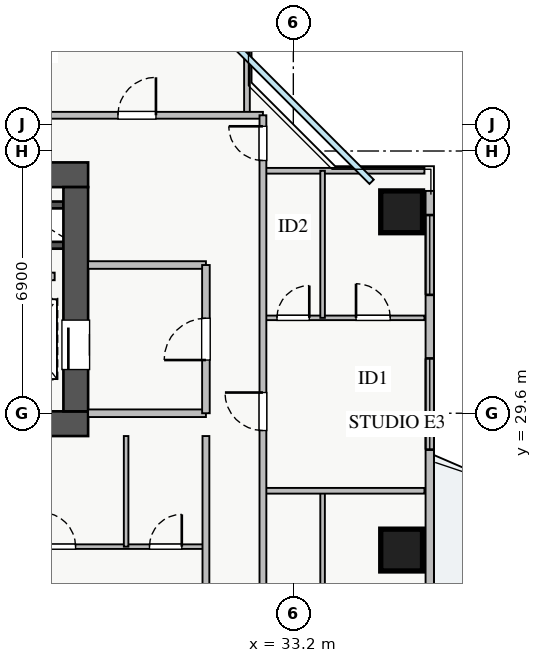
"""IFC4 building model, lengths in metres.
Left out: names, types, materials, properties, quantities, classifications, styles, units other than length and angle.
Written with IfcOpenShell. Run it as: python <this file> out.ifc"""

import sys

from ifc_helpers import new_model, si_unit, direction, frame, frame_2d, origin, origin_2d, place, context, subcontext, project, spatial, rectangle, extrude, source, transform, mapped, element, fill, save


model = new_model("IFC4")
c1 = context("Model", 3, precision=1e-05, world=origin(), true_north=direction((0.0, 1.0)))
c2 = subcontext(c1, "Body", "Model", "MODEL_VIEW")
j1 = project(units=[si_unit("LENGTHUNIT", "METRE"), si_unit("PLANEANGLEUNIT", "RADIAN")], contexts=[c1])
p1 = place(None, origin())
s1 = spatial("IfcSite", under=j1, at=p1, CompositionType="ELEMENT")
p2 = place(p1, origin())
s2 = spatial("IfcBuilding", under=s1, at=p2, CompositionType="ELEMENT")
p3 = place(p2, frame((0.0, 0.0, 100.25)))
s3 = spatial("IfcBuildingStorey", under=s2, at=p3, CompositionType="ELEMENT", Elevation=100.25)
for number, where, z_axis, x_axis in (
    (1, (25.8, 35.08, 0.0), (0.0, 0.0, 1.0), (1.0, 0.0, 0.0)),
    (2, (25.8, 34.02, 0.0), (0.0, 0.0, 1.0), (1.0, 0.0, 0.0)),
):
    element("IfcWall", number, at=place(p3, frame(where, z_axis=z_axis, x_axis=x_axis)), inside=s3, PredefinedType="SHEAR", context=c2, shape_type="SweptSolid", body=[
        extrude(rectangle(XDim=1.35, YDim=0.18, at=frame_2d((0.675, 0.0))), origin(), (0.0, 0.0, 1.0), 3.07),
    ])
p4 = place(p3, frame((10.2, 29.325, 0.0), z_axis=(0.0, 0.0, 1.0), x_axis=(1.0, 0.0, 0.0)))
e3 = element("IfcWall", 3, at=p4, inside=s3, PredefinedType="SHEAR", context=c2, shape_type="SweptSolid", body=[
    extrude(rectangle(XDim=17.6, YDim=0.65, at=frame_2d((8.8, 0.0))), origin(), (0.0, 0.0, 1.0), 3.25),
])
p5 = place(p3, frame((10.2, 35.875, 0.0), z_axis=(0.0, 0.0, 1.0), x_axis=(1.0, 0.0, 0.0)))
e4 = element("IfcWall", 4, at=p5, inside=s3, PredefinedType="SHEAR", context=c2, shape_type="SweptSolid", body=[
    extrude(rectangle(XDim=17.6, YDim=0.65, at=frame_2d((8.8, 0.0))), origin(), (0.0, 0.0, 1.0), 3.25),
])
p6 = place(p5, frame((1.15, 0.0, 0.0)))
e5 = element("IfcOpeningElement", 5, at=p6, cuts=e4, PredefinedType="OPENING", context=c2, shape_type="SweptSolid", body=[
    extrude(rectangle(XDim=1.1, YDim=2.05, at=frame_2d((0.55, 1.025))), frame((0.0, 0.335, 0.0), z_axis=(0.0, -1.0, 0.0), x_axis=(1.0, 0.0, 0.0)), (0.0, 0.0, 1.0), 0.67),
])
p7 = place(p5, frame((8.3, 0.0, 0.0)))
e6 = element("IfcOpeningElement", 6, at=p7, cuts=e4, PredefinedType="OPENING", context=c2, shape_type="SweptSolid", body=[
    extrude(rectangle(XDim=1.1, YDim=2.05, at=frame_2d((0.55, 1.025))), frame((0.0, 0.335, 0.0), z_axis=(0.0, -1.0, 0.0), x_axis=(1.0, 0.0, 0.0)), (0.0, 0.0, 1.0), 0.67),
])
p8 = place(p5, frame((4.9, 0.0, 0.0)))
e7 = element("IfcOpeningElement", 7, at=p8, cuts=e4, PredefinedType="OPENING", context=c2, shape_type="SweptSolid", body=[
    extrude(rectangle(XDim=1.1, YDim=2.05, at=frame_2d((0.55, 1.025))), frame((0.0, 0.335, 0.0), z_axis=(0.0, -1.0, 0.0), x_axis=(1.0, 0.0, 0.0)), (0.0, 0.0, 1.0), 0.67),
])
p9 = place(p5, frame((14.74, 0.0, 0.0)))
e8 = element("IfcOpeningElement", 8, at=p9, cuts=e4, PredefinedType="OPENING", context=c2, shape_type="SweptSolid", body=[
    extrude(rectangle(XDim=1.0, YDim=2.05, at=frame_2d((0.5, 1.025))), frame((0.0, 0.335, 0.0), z_axis=(0.0, -1.0, 0.0), x_axis=(1.0, 0.0, 0.0)), (0.0, 0.0, 1.0), 0.67),
])
p10 = place(p5, frame((10.25, 0.0, 0.0)))
e9 = element("IfcOpeningElement", 9, at=p10, cuts=e4, PredefinedType="OPENING", context=c2, shape_type="SweptSolid", body=[
    extrude(rectangle(XDim=1.0, YDim=2.05, at=frame_2d((0.5, 1.025))), frame((0.0, 0.335, 0.0), z_axis=(0.0, -1.0, 0.0), x_axis=(1.0, 0.0, 0.0)), (0.0, 0.0, 1.0), 0.67),
])
p11 = place(p5, frame((12.7, 0.0, 0.0)))
e10 = element("IfcOpeningElement", 10, at=p11, cuts=e4, PredefinedType="OPENING", context=c2, shape_type="SweptSolid", body=[
    extrude(rectangle(XDim=1.0, YDim=2.05, at=frame_2d((0.5, 1.025))), frame((0.0, 0.335, 0.0), z_axis=(0.0, -1.0, 0.0), x_axis=(1.0, 0.0, 0.0)), (0.0, 0.0, 1.0), 0.67),
])
p12 = place(p3, frame((27.475, 29.65, 0.0), z_axis=(0.0, 0.0, 1.0), x_axis=(0.0, 1.0, 0.0)))
e11 = element("IfcWall", 11, at=p12, inside=s3, PredefinedType="SHEAR", context=c2, shape_type="SweptSolid", body=[
    extrude(rectangle(XDim=5.9, YDim=0.65, at=frame_2d((2.95, 0.0))), origin(), (0.0, 0.0, 1.0), 3.25),
])
p13 = place(p12, frame((1.1, 0.0, 0.0)))
e12 = element("IfcOpeningElement", 12, at=p13, cuts=e11, PredefinedType="OPENING", context=c2, shape_type="SweptSolid", body=[
    extrude(rectangle(XDim=1.3, YDim=2.05, at=frame_2d((0.65, 1.025))), frame((0.0, 0.335, 0.0), z_axis=(0.0, -1.0, 0.0), x_axis=(1.0, 0.0, 0.0)), (0.0, 0.0, 1.0), 0.67),
])
m1 = source(origin(), c2, "Body", "SweptSolid", [
    extrude(rectangle(XDim=1.1, YDim=1.1, at=origin_2d()), origin(), (0.0, 0.0, 1.0), 3.25),
])
for number, where, z_axis, x_axis in (
    (13, (36.05, 26.0, 0.0), (0.0, 0.0, 1.0), (1.0, 0.0, 0.0)),
    (14, (36.05, 34.9, 0.0), (0.0, 0.0, 1.0), (1.0, 0.0, 0.0)),
):
    element("IfcColumn", number, at=place(p3, frame(where, z_axis=z_axis, x_axis=x_axis)), inside=s3, PredefinedType="COLUMN", context=c2, shape_type="MappedRepresentation", body=[
        mapped(m1, transform((0.0, 0.0, 0.0), x_axis=(1.0, 0.0, 0.0), y_axis=(0.0, 1.0, 0.0), z_axis=(0.0, 0.0, 1.0), scale=1.0)),
    ])
p14 = place(p3, frame((36.79, 10.55, 0.0), z_axis=(0.0, 0.0, 1.0), x_axis=(0.0, 1.0, 0.0)))
e15 = element("IfcWall", 15, at=p14, inside=s3, PredefinedType="STANDARD", context=c2, shape_type="SweptSolid", body=[
    extrude(rectangle(XDim=24.9, YDim=0.22, at=frame_2d((12.45, 0.0))), origin(), (0.0, 0.0, 1.0), 2.61),
])
p15 = place(p14, frame((13.3, 0.0, 0.0)))
e16 = element("IfcOpeningElement", 16, at=p15, cuts=e15, PredefinedType="OPENING", context=c2, shape_type="SweptSolid", body=[
    extrude(rectangle(XDim=1.2, YDim=2.1, at=frame_2d((0.6, 1.05))), frame((0.0, 0.12, 0.0), z_axis=(0.0, -1.0, 0.0), x_axis=(1.0, 0.0, 0.0)), (0.0, 0.0, 1.0), 0.24),
])
p16 = place(p14, frame((1.912, 0.0, 0.9)))
e17 = element("IfcOpeningElement", 17, at=p16, cuts=e15, PredefinedType="OPENING", context=c2, shape_type="SweptSolid", body=[
    extrude(rectangle(XDim=2.4, YDim=1.48, at=frame_2d((1.2, 0.74))), frame((0.0, 0.12, 0.0), z_axis=(0.0, -1.0, 0.0), x_axis=(1.0, 0.0, 0.0)), (0.0, 0.0, 1.0), 0.24),
])
p17 = place(p14, frame((22.165, 0.0, 0.9)))
e18 = element("IfcOpeningElement", 18, at=p17, cuts=e15, PredefinedType="OPENING", context=c2, shape_type="SweptSolid", body=[
    extrude(rectangle(XDim=2.1, YDim=1.5, at=frame_2d((1.05, 0.75))), frame((0.0, 0.12, 0.0), z_axis=(0.0, -1.0, 0.0), x_axis=(1.0, 0.0, 0.0)), (0.0, 0.0, 1.0), 0.24),
])
p18 = place(p14, frame((18.093, 0.0, 0.9)))
e19 = element("IfcOpeningElement", 19, at=p18, cuts=e15, PredefinedType="OPENING", context=c2, shape_type="SweptSolid", body=[
    extrude(rectangle(XDim=2.4, YDim=1.5, at=frame_2d((1.2, 0.75))), frame((0.0, 0.12, 0.0), z_axis=(0.0, -1.0, 0.0), x_axis=(1.0, 0.0, 0.0)), (0.0, 0.0, 1.0), 0.24),
])
p19 = place(p14, frame((9.045, 0.0, 0.9)))
e20 = element("IfcOpeningElement", 20, at=p19, cuts=e15, PredefinedType="OPENING", context=c2, shape_type="SweptSolid", body=[
    extrude(rectangle(XDim=0.9, YDim=1.2, at=frame_2d((0.45, 0.6))), frame((0.0, 0.12, 0.0), z_axis=(0.0, -1.0, 0.0), x_axis=(1.0, 0.0, 0.0)), (0.0, 0.0, 1.0), 0.24),
])
for number, where, z_axis, x_axis in (
    (21, (27.8, 29.6, 0.0), (0.0, 0.0, 1.0), (1.0, 0.0, 0.0)),
    (22, (27.8, 33.5, 0.0), (0.0, 0.0, 1.0), (1.0, 0.0, 0.0)),
):
    element("IfcWall", number, at=place(p3, frame(where, z_axis=z_axis, x_axis=x_axis)), inside=s3, PredefinedType="PARTITIONING", context=c2, shape_type="SweptSolid", body=[
        extrude(rectangle(XDim=3.1, YDim=0.2, at=frame_2d((1.55, 0.0))), origin(), (0.0, 0.0, 1.0), 3.07),
    ])
p20 = place(p3, frame((30.9, 29.6, 0.0), z_axis=(0.0, 0.0, 1.0), x_axis=(0.0, 1.0, 0.0)))
e23 = element("IfcWall", 23, at=p20, inside=s3, PredefinedType="PARTITIONING", context=c2, shape_type="SweptSolid", body=[
    extrude(rectangle(XDim=3.9, YDim=0.2, at=frame_2d((1.95, 0.0))), origin(), (0.0, 0.0, 1.0), 3.07),
])
p21 = place(p20, frame((1.4, 0.0, 0.0)))
e24 = element("IfcOpeningElement", 24, at=p21, cuts=e23, PredefinedType="OPENING", context=c2, shape_type="SweptSolid", body=[
    extrude(rectangle(XDim=1.1, YDim=2.05, at=frame_2d((0.55, 1.025))), frame((0.0, 0.11, 0.0), z_axis=(0.0, -1.0, 0.0), x_axis=(1.0, 0.0, 0.0)), (0.0, 0.0, 1.0), 0.22),
])
p22 = place(p3, frame((21.75, 33.2, 0.0), z_axis=(0.0, 0.0, 1.0), x_axis=(1.0, 0.0, 0.0)))
e25 = element("IfcWall", 25, at=p22, inside=s3, PredefinedType="PARTITIONING", context=c2, shape_type="SweptSolid", body=[
    extrude(rectangle(XDim=5.17, YDim=0.2, at=frame_2d((2.585, 0.0))), origin(), (0.0, 0.0, 1.0), 3.07),
])
p23 = place(p3, frame((31.98, 37.44, 0.0), z_axis=(0.0, 0.0, 1.0), x_axis=(0.0, 1.0, 0.0)))
e26 = element("IfcWall", 26, at=p23, inside=s3, PredefinedType="PARTITIONING", context=c2, shape_type="SweptSolid", body=[
    extrude(rectangle(XDim=3.21, YDim=0.15, at=frame_2d((1.605, 0.0))), origin(), (0.0, 0.0, 1.0), 3.07),
])
p24 = place(p3, frame((8.82, 37.44, 0.0), z_axis=(0.0, 0.0, 1.0), x_axis=(1.0, 0.0, 0.0)))
e27 = element("IfcWall", 27, at=p24, inside=s3, PredefinedType="PARTITIONING", context=c2, shape_type="SweptSolid", body=[
    extrude(rectangle(XDim=23.58, YDim=0.18, at=frame_2d((11.79, 0.0))), origin(), (0.0, 0.0, 1.0), 3.07),
])
p25 = place(p24, frame((2.75, 0.0, 0.0)))
e28 = element("IfcOpeningElement", 28, at=p25, cuts=e27, PredefinedType="OPENING", context=c2, shape_type="SweptSolid", body=[
    extrude(rectangle(XDim=1.0, YDim=2.05, at=frame_2d((0.5, 1.025))), frame((0.0, 0.1, 0.0), z_axis=(0.0, -1.0, 0.0), x_axis=(1.0, 0.0, 0.0)), (0.0, 0.0, 1.0), 0.2),
])
p26 = place(p24, frame((7.89, 0.0, 0.0)))
e29 = element("IfcOpeningElement", 29, at=p26, cuts=e27, PredefinedType="OPENING", context=c2, shape_type="SweptSolid", body=[
    extrude(rectangle(XDim=1.0, YDim=2.05, at=frame_2d((0.5, 1.025))), frame((0.0, 0.1, 0.0), z_axis=(0.0, -1.0, 0.0), x_axis=(1.0, 0.0, 0.0)), (0.0, 0.0, 1.0), 0.2),
])
p27 = place(p24, frame((13.325, 0.0, 0.0)))
e30 = element("IfcOpeningElement", 30, at=p27, cuts=e27, PredefinedType="OPENING", context=c2, shape_type="SweptSolid", body=[
    extrude(rectangle(XDim=1.0, YDim=2.05, at=frame_2d((0.5, 1.025))), frame((0.0, 0.1, 0.0), z_axis=(0.0, -1.0, 0.0), x_axis=(1.0, 0.0, 0.0)), (0.0, 0.0, 1.0), 0.2),
])
p28 = place(p24, frame((19.765, 0.0, 0.0)))
e31 = element("IfcOpeningElement", 31, at=p28, cuts=e27, PredefinedType="OPENING", context=c2, shape_type="SweptSolid", body=[
    extrude(rectangle(XDim=1.0, YDim=2.05, at=frame_2d((0.5, 1.025))), frame((0.0, 0.1, 0.0), z_axis=(0.0, -1.0, 0.0), x_axis=(1.0, 0.0, 0.0)), (0.0, 0.0, 1.0), 0.2),
])
p29 = place(p3, frame((32.4, 35.98, 0.0), z_axis=(0.0, 0.0, 1.0), x_axis=(1.0, 0.0, 0.0)))
e32 = element("IfcWall", 32, at=p29, inside=s3, PredefinedType="PARTITIONING", context=c2, shape_type="SweptSolid", body=[
    extrude(rectangle(XDim=4.25, YDim=0.15, at=frame_2d((2.125, 0.0))), origin(), (0.0, 0.0, 1.0), 3.07),
])
p30 = place(p3, frame((33.97, 23.1, 0.0), z_axis=(0.0, 0.0, 1.0), x_axis=(0.0, 1.0, 0.0)))
e33 = element("IfcWall", 33, at=p30, inside=s3, PredefinedType="PLUMBINGWALL", context=c2, shape_type="SweptSolid", body=[
    extrude(rectangle(XDim=4.46, YDim=0.12, at=frame_2d((2.23, 0.0))), origin(), (0.0, 0.0, 1.0), 3.07),
])
p31 = place(p3, frame((32.4, 32.11, 0.0), z_axis=(0.0, 0.0, 1.0), x_axis=(1.0, 0.0, 0.0)))
e34 = element("IfcWall", 34, at=p31, inside=s3, PredefinedType="PLUMBINGWALL", context=c2, shape_type="SweptSolid", body=[
    extrude(rectangle(XDim=4.25, YDim=0.12, at=frame_2d((2.125, 0.0))), origin(), (0.0, 0.0, 1.0), 3.07),
])
p32 = place(p31, frame((0.37, 0.0, 0.0)))
e35 = element("IfcOpeningElement", 35, at=p32, cuts=e34, PredefinedType="OPENING", context=c2, shape_type="SweptSolid", body=[
    extrude(rectangle(XDim=0.85, YDim=2.05, at=frame_2d((0.425, 1.025))), frame((0.0, 0.07, 0.0), z_axis=(0.0, -1.0, 0.0), x_axis=(1.0, 0.0, 0.0)), (0.0, 0.0, 1.0), 0.14),
])
p33 = place(p31, frame((2.45, 0.0, 0.0)))
e36 = element("IfcOpeningElement", 36, at=p33, cuts=e34, PredefinedType="OPENING", context=c2, shape_type="SweptSolid", body=[
    extrude(rectangle(XDim=0.9, YDim=2.05, at=frame_2d((0.45, 1.025))), frame((0.0, 0.07, 0.0), z_axis=(0.0, -1.0, 0.0), x_axis=(1.0, 0.0, 0.0)), (0.0, 0.0, 1.0), 0.14),
])
p34 = place(p3, frame((33.97, 32.11, 0.0), z_axis=(0.0, 0.0, 1.0), x_axis=(0.0, 1.0, 0.0)))
e37 = element("IfcWall", 37, at=p34, inside=s3, PredefinedType="PLUMBINGWALL", context=c2, shape_type="SweptSolid", body=[
    extrude(rectangle(XDim=3.87, YDim=0.12, at=frame_2d((1.935, 0.0))), origin(), (0.0, 0.0, 1.0), 3.07),
])
p35 = place(p3, frame((32.4, 27.56, 0.0), z_axis=(0.0, 0.0, 1.0), x_axis=(1.0, 0.0, 0.0)))
e38 = element("IfcWall", 38, at=p35, inside=s3, PredefinedType="PARTITIONING", context=c2, shape_type="SweptSolid", body=[
    extrude(rectangle(XDim=4.25, YDim=0.15, at=frame_2d((2.125, 0.0))), origin(), (0.0, 0.0, 1.0), 3.07),
])
p36 = place(p3, frame((32.4, 8.31, 0.0), z_axis=(0.0, 0.0, 1.0), x_axis=(0.0, 1.0, 0.0)))
e39 = element("IfcWall", 39, at=p36, inside=s3, PredefinedType="PARTITIONING", context=c2, shape_type="SweptSolid", body=[
    extrude(rectangle(XDim=29.13, YDim=0.18, at=frame_2d((14.565, 0.0))), origin(), (0.0, 0.0, 1.0), 3.07),
])
p37 = place(p36, frame((27.94, 0.0, 0.0)))
e40 = element("IfcOpeningElement", 40, at=p37, cuts=e39, PredefinedType="OPENING", context=c2, shape_type="SweptSolid", body=[
    extrude(rectangle(XDim=0.9, YDim=2.05, at=frame_2d((0.45, 1.025))), frame((0.0, 0.1, 0.0), z_axis=(0.0, -1.0, 0.0), x_axis=(1.0, 0.0, 0.0)), (0.0, 0.0, 1.0), 0.2),
])
p38 = place(p36, frame((0.415, 0.0, 0.0)))
e41 = element("IfcOpeningElement", 41, at=p38, cuts=e39, PredefinedType="OPENING", context=c2, shape_type="SweptSolid", body=[
    extrude(rectangle(XDim=0.9, YDim=2.05, at=frame_2d((0.45, 1.025))), frame((0.0, 0.1, 0.0), z_axis=(0.0, -1.0, 0.0), x_axis=(1.0, 0.0, 0.0)), (0.0, 0.0, 1.0), 0.2),
])
p39 = place(p36, frame((5.88, 0.0, 0.0)))
e42 = element("IfcOpeningElement", 42, at=p39, cuts=e39, PredefinedType="OPENING", context=c2, shape_type="SweptSolid", body=[
    extrude(rectangle(XDim=1.0, YDim=2.05, at=frame_2d((0.5, 1.025))), frame((0.0, 0.1, 0.0), z_axis=(0.0, -1.0, 0.0), x_axis=(1.0, 0.0, 0.0)), (0.0, 0.0, 1.0), 0.2),
])
p40 = place(p36, frame((12.23, 0.0, 0.0)))
e43 = element("IfcOpeningElement", 43, at=p40, cuts=e39, PredefinedType="OPENING", context=c2, shape_type="SweptSolid", body=[
    extrude(rectangle(XDim=1.0, YDim=2.05, at=frame_2d((0.5, 1.025))), frame((0.0, 0.1, 0.0), z_axis=(0.0, -1.0, 0.0), x_axis=(1.0, 0.0, 0.0)), (0.0, 0.0, 1.0), 0.2),
])
p41 = place(p36, frame((20.835, 0.0, 0.0)))
e44 = element("IfcOpeningElement", 44, at=p41, cuts=e39, PredefinedType="OPENING", context=c2, shape_type="SweptSolid", body=[
    extrude(rectangle(XDim=1.0, YDim=2.05, at=frame_2d((0.5, 1.025))), frame((0.0, 0.1, 0.0), z_axis=(0.0, -1.0, 0.0), x_axis=(1.0, 0.0, 0.0)), (0.0, 0.0, 1.0), 0.2),
])
p42 = place(p3, frame((25.22, 26.09, 0.0), z_axis=(0.0, 0.0, 1.0), x_axis=(1.0, 0.0, 0.0)))
e45 = element("IfcWall", 45, at=p42, inside=s3, PredefinedType="PLUMBINGWALL", context=c2, shape_type="SweptSolid", body=[
    extrude(rectangle(XDim=5.68, YDim=0.12, at=frame_2d((2.84, 0.0))), origin(), (0.0, 0.0, 1.0), 2.625),
])
p43 = place(p42, frame((1.35, 0.0, 0.0)))
e46 = element("IfcOpeningElement", 46, at=p43, cuts=e45, PredefinedType="OPENING", context=c2, shape_type="SweptSolid", body=[
    extrude(rectangle(XDim=0.9, YDim=2.05, at=frame_2d((0.45, 1.025))), frame((0.0, 0.07, 0.0), z_axis=(0.0, -1.0, 0.0), x_axis=(1.0, 0.0, 0.0)), (0.0, 0.0, 1.0), 0.14),
])
p44 = place(p42, frame((4.195, 0.0, 0.0)))
e47 = element("IfcOpeningElement", 47, at=p44, cuts=e45, PredefinedType="OPENING", context=c2, shape_type="SweptSolid", body=[
    extrude(rectangle(XDim=0.85, YDim=2.05, at=frame_2d((0.425, 1.025))), frame((0.0, 0.07, 0.0), z_axis=(0.0, -1.0, 0.0), x_axis=(1.0, 0.0, 0.0)), (0.0, 0.0, 1.0), 0.14),
])
p45 = place(p3, frame((28.8, 26.09, 0.0), z_axis=(0.0, 0.0, 1.0), x_axis=(0.0, 1.0, 0.0)))
e48 = element("IfcWall", 48, at=p45, inside=s3, PredefinedType="PLUMBINGWALL", context=c2, shape_type="SweptSolid", body=[
    extrude(rectangle(XDim=2.91, YDim=0.12, at=frame_2d((1.455, 0.0))), origin(), (0.0, 0.0, 1.0), 3.07),
])
p46 = place(p3, frame((30.9, 17.0, 0.0), z_axis=(0.0, 0.0, 1.0), x_axis=(0.0, 1.0, 0.0)))
e49 = element("IfcWall", 49, at=p46, inside=s3, PredefinedType="PARTITIONING", context=c2, shape_type="SweptSolid", body=[
    extrude(rectangle(XDim=12.0, YDim=0.18, at=frame_2d((6.0, 0.0))), origin(), (0.0, 0.0, 1.0), 3.07),
])
p47 = place(p46, frame((0.84, 0.0, 0.0)))
e50 = element("IfcOpeningElement", 50, at=p47, cuts=e49, PredefinedType="OPENING", context=c2, shape_type="SweptSolid", body=[
    extrude(rectangle(XDim=1.0, YDim=2.05, at=frame_2d((0.5, 1.025))), frame((0.0, 0.1, 0.0), z_axis=(0.0, -1.0, 0.0), x_axis=(1.0, 0.0, 0.0)), (0.0, 0.0, 1.0), 0.2),
])
p48 = place(p46, frame((6.69, 0.0, 0.0)))
e51 = element("IfcOpeningElement", 51, at=p48, cuts=e49, PredefinedType="OPENING", context=c2, shape_type="SweptSolid", body=[
    extrude(rectangle(XDim=1.0, YDim=2.05, at=frame_2d((0.5, 1.025))), frame((0.0, 0.1, 0.0), z_axis=(0.0, -1.0, 0.0), x_axis=(1.0, 0.0, 0.0)), (0.0, 0.0, 1.0), 0.2),
])
m2 = source(origin(), c2, "Body", "SweptSolid", [
    extrude(rectangle(XDim=2.1, YDim=1.5, at=frame_2d((1.05, 0.75))), frame((0.0, 0.03, 0.0), z_axis=(0.0, -1.0, 0.0), x_axis=(1.0, 0.0, 0.0)), (0.0, 0.0, 1.0), 0.06),
])
p49 = place(p17, origin())
e52 = element("IfcWindow", 52, at=p49, inside=s3, PartitioningType="TRIPLE_PANEL_VERTICAL", PredefinedType="WINDOW", context=c2, shape_type="MappedRepresentation", body=[
    mapped(m2, transform((0.0, 0.0, 0.0), x_axis=(1.0, 0.0, 0.0), y_axis=(0.0, 1.0, 0.0), z_axis=(0.0, 0.0, 1.0), scale=1.0)),
])
fill(e18, e52)
m3 = source(origin(), c2, "Body", "SweptSolid", [
    extrude(rectangle(XDim=1.3, YDim=2.05, at=frame_2d((0.65, 1.025))), frame((0.0, 0.025, 0.0), z_axis=(0.0, -1.0, 0.0), x_axis=(1.0, 0.0, 0.0)), (0.0, 0.0, 1.0), 0.05),
])
p50 = place(p13, origin())
e53 = element("IfcDoor", 53, at=p50, inside=s3, OperationType="SLIDING_TO_LEFT", PredefinedType="DOOR", context=c2, shape_type="MappedRepresentation", body=[
    mapped(m3, transform((0.0, 0.0, 0.0), x_axis=(1.0, 0.0, 0.0), y_axis=(0.0, 1.0, 0.0), z_axis=(0.0, 0.0, 1.0), scale=1.0)),
])
fill(e12, e53)
m4 = source(origin(), c2, "Body", "SweptSolid", [
    extrude(rectangle(XDim=1.1, YDim=2.05, at=frame_2d((0.55, 1.025))), frame((0.0, 0.025, 0.0), z_axis=(0.0, -1.0, 0.0), x_axis=(1.0, 0.0, 0.0)), (0.0, 0.0, 1.0), 0.05),
])
p51 = place(p21, origin())
e54 = element("IfcDoor", 54, at=p51, inside=s3, OperationType="SINGLE_SWING_LEFT", PredefinedType="DOOR", context=c2, shape_type="MappedRepresentation", body=[
    mapped(m4, transform((0.0, 0.0, 0.0), x_axis=(1.0, 0.0, 0.0), y_axis=(0.0, 1.0, 0.0), z_axis=(0.0, 0.0, 1.0), scale=1.0)),
])
fill(e24, e54)
m5 = source(origin(), c2, "Body", "SweptSolid", [
    extrude(rectangle(XDim=1.0, YDim=2.05, at=frame_2d((0.5, 1.025))), frame((0.0, 0.025, 0.0), z_axis=(0.0, -1.0, 0.0), x_axis=(1.0, 0.0, 0.0)), (0.0, 0.0, 1.0), 0.05),
])
p52 = place(p28, origin())
e55 = element("IfcDoor", 55, at=p52, inside=s3, OperationType="SINGLE_SWING_RIGHT", PredefinedType="DOOR", context=c2, shape_type="MappedRepresentation", body=[
    mapped(m5, transform((0.0, 0.0, 0.0), x_axis=(1.0, 0.0, 0.0), y_axis=(0.0, 1.0, 0.0), z_axis=(0.0, 0.0, 1.0), scale=1.0)),
])
fill(e31, e55)
m6 = source(origin(), c2, "Body", "SweptSolid", [
    extrude(rectangle(XDim=0.85, YDim=2.05, at=frame_2d((0.425, 1.025))), frame((0.0, 0.025, 0.0), z_axis=(0.0, -1.0, 0.0), x_axis=(1.0, 0.0, 0.0)), (0.0, 0.0, 1.0), 0.05),
])
p53 = place(p32, origin())
e56 = element("IfcDoor", 56, at=p53, inside=s3, OperationType="SINGLE_SWING_RIGHT", PredefinedType="DOOR", context=c2, shape_type="MappedRepresentation", body=[
    mapped(m6, transform((0.0, 0.0, 0.0), x_axis=(1.0, 0.0, 0.0), y_axis=(0.0, 1.0, 0.0), z_axis=(0.0, 0.0, 1.0), scale=1.0)),
])
fill(e35, e56)
m7 = source(origin(), c2, "Body", "SweptSolid", [
    extrude(rectangle(XDim=0.9, YDim=2.05, at=frame_2d((0.45, 1.025))), frame((0.0, 0.025, 0.0), z_axis=(0.0, -1.0, 0.0), x_axis=(1.0, 0.0, 0.0)), (0.0, 0.0, 1.0), 0.05),
])
p54 = place(p33, origin())
e57 = element("IfcDoor", 57, at=p54, inside=s3, OperationType="SINGLE_SWING_LEFT", PredefinedType="DOOR", context=c2, shape_type="MappedRepresentation", body=[
    mapped(m7, transform((0.0, 0.0, 0.0), x_axis=(1.0, 0.0, 0.0), y_axis=(0.0, 1.0, 0.0), z_axis=(0.0, 0.0, 1.0), scale=1.0)),
])
fill(e36, e57)
p55 = place(p37, origin())
e58 = element("IfcDoor", 58, at=p55, inside=s3, OperationType="SINGLE_SWING_RIGHT", PredefinedType="DOOR", context=c2, shape_type="MappedRepresentation", body=[
    mapped(m7, transform((0.0, 0.0, 0.0), x_axis=(1.0, 0.0, 0.0), y_axis=(0.0, 1.0, 0.0), z_axis=(0.0, 0.0, 1.0), scale=1.0)),
])
fill(e40, e58)
p56 = place(p41, origin())
e59 = element("IfcDoor", 59, at=p56, inside=s3, OperationType="SINGLE_SWING_RIGHT", PredefinedType="DOOR", context=c2, shape_type="MappedRepresentation", body=[
    mapped(m5, transform((0.0, 0.0, 0.0), x_axis=(1.0, 0.0, 0.0), y_axis=(0.0, 1.0, 0.0), z_axis=(0.0, 0.0, 1.0), scale=1.0)),
])
fill(e44, e59)
p57 = place(p43, origin())
e60 = element("IfcDoor", 60, at=p57, inside=s3, OperationType="SINGLE_SWING_LEFT", PredefinedType="DOOR", context=c2, shape_type="MappedRepresentation", body=[
    mapped(m7, transform((0.0, 0.0, 0.0), x_axis=(1.0, 0.0, 0.0), y_axis=(0.0, 1.0, 0.0), z_axis=(0.0, 0.0, 1.0), scale=1.0)),
])
fill(e46, e60)
p58 = place(p44, origin())
e61 = element("IfcDoor", 61, at=p58, inside=s3, OperationType="SINGLE_SWING_RIGHT", PredefinedType="DOOR", context=c2, shape_type="MappedRepresentation", body=[
    mapped(m6, transform((0.0, 0.0, 0.0), x_axis=(1.0, 0.0, 0.0), y_axis=(0.0, 1.0, 0.0), z_axis=(0.0, 0.0, 1.0), scale=1.0)),
])
fill(e47, e61)
m8 = source(origin(), c2, "Body", "SweptSolid", [
    extrude(rectangle(XDim=2.4, YDim=1.5, at=frame_2d((1.2, 0.75))), frame((0.0, 0.03, 0.0), z_axis=(0.0, -1.0, 0.0), x_axis=(1.0, 0.0, 0.0)), (0.0, 0.0, 1.0), 0.06),
])
p59 = place(p18, origin())
e62 = element("IfcWindow", 62, at=p59, inside=s3, PartitioningType="TRIPLE_PANEL_VERTICAL", PredefinedType="WINDOW", context=c2, shape_type="MappedRepresentation", body=[
    mapped(m8, transform((0.0, 0.0, 0.0), x_axis=(1.0, 0.0, 0.0), y_axis=(0.0, 1.0, 0.0), z_axis=(0.0, 0.0, 1.0), scale=1.0)),
])
fill(e19, e62)
save(model, sys.argv[1])
